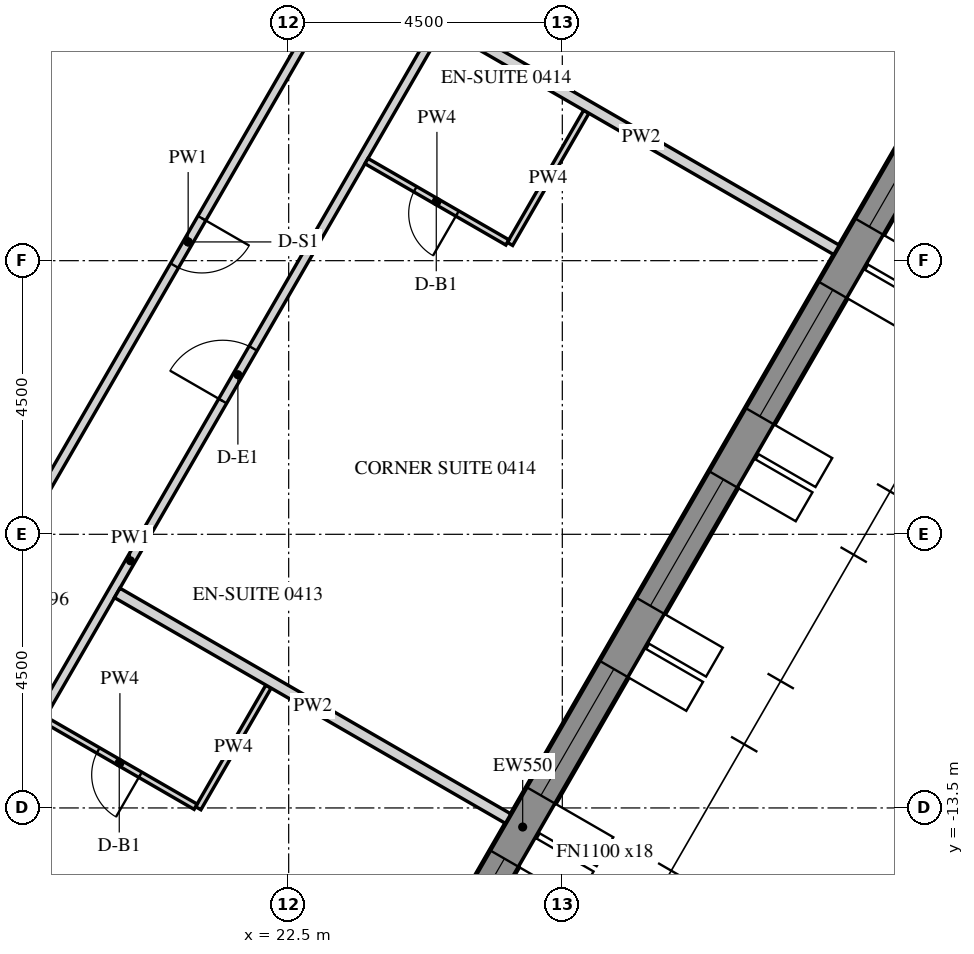
"""IFC4 building model, lengths in metres.
Left out: names, types, materials, properties, quantities, classifications, styles, units other than length and angle.
Written with IfcOpenShell. Run it as: python <this file> out.ifc"""

import sys

from ifc_helpers import new_model, si_unit, direction, frame, frame_2d, origin, place, context, subcontext, project, spatial, polyline, rectangle, outline, extrude, element, fill, save


model = new_model("IFC4")
c1 = context("Model", 3, precision=1e-05, world=origin(), true_north=direction((0.0, 1.0)))
c2 = subcontext(c1, "Body", "Model", "MODEL_VIEW")
j1 = project(units=[si_unit("LENGTHUNIT", "METRE"), si_unit("PLANEANGLEUNIT", "RADIAN")], contexts=[c1])
p1 = place(None, origin())
s1 = spatial("IfcSite", under=j1, at=p1, CompositionType="ELEMENT")
p2 = place(p1, origin())
s2 = spatial("IfcBuilding", under=s1, at=p2, CompositionType="ELEMENT")
p3 = place(p2, frame((0.0, 0.0, 68.7)))
s3 = spatial("IfcBuildingStorey", under=s2, at=p3, CompositionType="ELEMENT", Elevation=68.7)
p4 = place(p3, frame((18.83, -26.835, -0.15), z_axis=(0.0, 0.0, 1.0), x_axis=(0.500003800416, 0.866023209602, 0.0)))
e1 = element("IfcWall", 1, at=p4, inside=s3, PredefinedType="SOLIDWALL", context=c2, shape_type="SweptSolid", body=[
    extrude(outline(polyline([(-0.022, -0.275), (30.097, -0.275), (30.045, 0.275), (0.022, 0.275), (-0.022, -0.275)])), origin(), (0.0, 0.0, 1.0), 3.9),
])
p5 = place(p4, frame((1.236, 0.0, 1.05)))
e2 = element("IfcOpeningElement", 2, at=p5, cuts=e1, PredefinedType="OPENING", context=c2, shape_type="SweptSolid", body=[
    extrude(rectangle(XDim=2.4, YDim=2.4, at=frame_2d((1.2, 1.2))), frame((0.0, 0.285, 0.0), z_axis=(0.0, -1.0, 0.0), x_axis=(1.0, 0.0, 0.0)), (0.0, 0.0, 1.0), 0.57),
])
p6 = place(p4, frame((4.835, 0.0, 1.05)))
e3 = element("IfcOpeningElement", 3, at=p6, cuts=e1, PredefinedType="OPENING", context=c2, shape_type="SweptSolid", body=[
    extrude(rectangle(XDim=2.4, YDim=2.4, at=frame_2d((1.2, 1.2))), frame((0.0, 0.285, 0.0), z_axis=(0.0, -1.0, 0.0), x_axis=(1.0, 0.0, 0.0)), (0.0, 0.0, 1.0), 0.57),
])
p7 = place(p4, frame((8.436, 0.0, 1.05)))
e4 = element("IfcOpeningElement", 4, at=p7, cuts=e1, PredefinedType="OPENING", context=c2, shape_type="SweptSolid", body=[
    extrude(rectangle(XDim=2.4, YDim=2.4, at=frame_2d((1.2, 1.2))), frame((0.0, 0.285, 0.0), z_axis=(0.0, -1.0, 0.0), x_axis=(1.0, 0.0, 0.0)), (0.0, 0.0, 1.0), 0.57),
])
p8 = place(p4, frame((12.035, 0.0, 1.05)))
e5 = element("IfcOpeningElement", 5, at=p8, cuts=e1, PredefinedType="OPENING", context=c2, shape_type="SweptSolid", body=[
    extrude(rectangle(XDim=2.4, YDim=2.4, at=frame_2d((1.2, 1.2))), frame((0.0, 0.285, 0.0), z_axis=(0.0, -1.0, 0.0), x_axis=(1.0, 0.0, 0.0)), (0.0, 0.0, 1.0), 0.57),
])
p9 = place(p4, frame((15.635, 0.0, 1.05)))
e6 = element("IfcOpeningElement", 6, at=p9, cuts=e1, PredefinedType="OPENING", context=c2, shape_type="SweptSolid", body=[
    extrude(rectangle(XDim=2.4, YDim=2.4, at=frame_2d((1.2, 1.2))), frame((0.0, 0.285, 0.0), z_axis=(0.0, -1.0, 0.0), x_axis=(1.0, 0.0, 0.0)), (0.0, 0.0, 1.0), 0.57),
])
p10 = place(p4, frame((19.236, 0.0, 1.05)))
e7 = element("IfcOpeningElement", 7, at=p10, cuts=e1, PredefinedType="OPENING", context=c2, shape_type="SweptSolid", body=[
    extrude(rectangle(XDim=2.4, YDim=2.4, at=frame_2d((1.2, 1.2))), frame((0.0, 0.285, 0.0), z_axis=(0.0, -1.0, 0.0), x_axis=(1.0, 0.0, 0.0)), (0.0, 0.0, 1.0), 0.57),
])
p11 = place(p4, frame((22.835, 0.0, 1.05)))
e8 = element("IfcOpeningElement", 8, at=p11, cuts=e1, PredefinedType="OPENING", context=c2, shape_type="SweptSolid", body=[
    extrude(rectangle(XDim=2.4, YDim=2.4, at=frame_2d((1.2, 1.2))), frame((0.0, 0.285, 0.0), z_axis=(0.0, -1.0, 0.0), x_axis=(1.0, 0.0, 0.0)), (0.0, 0.0, 1.0), 0.57),
])
p12 = place(p4, frame((26.436, 0.0, 1.05)))
e9 = element("IfcOpeningElement", 9, at=p12, cuts=e1, PredefinedType="OPENING", context=c2, shape_type="SweptSolid", body=[
    extrude(rectangle(XDim=2.4, YDim=2.4, at=frame_2d((1.2, 1.2))), frame((0.0, 0.285, 0.0), z_axis=(0.0, -1.0, 0.0), x_axis=(1.0, 0.0, 0.0)), (0.0, 0.0, 1.0), 0.57),
])
p13 = place(p3, frame((13.928, -19.775, 0.0), z_axis=(0.0, 0.0, 1.0), x_axis=(0.50000450071, 0.866022805283, 0.0)))
e10 = element("IfcWall", 10, at=p13, inside=s3, PredefinedType="PARTITIONING", context=c2, shape_type="SweptSolid", body=[
    extrude(rectangle(XDim=23.877, YDim=0.15, at=frame_2d((11.938, 0.0))), origin(), (0.0, 0.0, 1.0), 2.988),
])
p14 = place(p13, frame((3.943, 0.0, 0.0)))
e11 = element("IfcOpeningElement", 11, at=p14, cuts=e10, PredefinedType="OPENING", context=c2, shape_type="SweptSolid", body=[
    extrude(rectangle(XDim=1.0, YDim=2.1, at=frame_2d((0.5, 1.05))), frame((0.0, 0.085, 0.0), z_axis=(0.0, -1.0, 0.0), x_axis=(1.0, 0.0, 0.0)), (0.0, 0.0, 1.0), 0.17),
])
p15 = place(p13, frame((14.972, 0.0, 0.0)))
e12 = element("IfcOpeningElement", 12, at=p15, cuts=e10, PredefinedType="OPENING", context=c2, shape_type="SweptSolid", body=[
    extrude(rectangle(XDim=1.0, YDim=2.1, at=frame_2d((0.5, 1.05))), frame((0.0, 0.085, 0.0), z_axis=(0.0, -1.0, 0.0), x_axis=(1.0, 0.0, 0.0)), (0.0, 0.0, 1.0), 0.17),
])
p16 = place(p3, frame((23.704, 0.757, 0.0), z_axis=(0.0, 0.0, 1.0), x_axis=(-0.500010297365, -0.866019458516, 0.0)))
e13 = element("IfcWall", 13, at=p16, inside=s3, PredefinedType="PARTITIONING", context=c2, shape_type="SweptSolid", body=[
    extrude(rectangle(XDim=11.429, YDim=0.15, at=frame_2d((5.714, 0.0))), origin(), (0.0, 0.0, 1.0), 2.988),
])
p17 = place(p16, frame((5.264, 0.0, 0.0)))
e14 = element("IfcOpeningElement", 14, at=p17, cuts=e13, PredefinedType="OPENING", context=c2, shape_type="SweptSolid", body=[
    extrude(rectangle(XDim=0.9, YDim=2.1, at=frame_2d((0.45, 1.05))), frame((0.0, 0.085, 0.0), z_axis=(0.0, -1.0, 0.0), x_axis=(1.0, 0.0, 0.0)), (0.0, 0.0, 1.0), 0.17),
])
p18 = place(p3, frame((22.168, -11.504, 0.0), z_axis=(0.0, 0.0, 1.0), x_axis=(-0.500015210774, -0.866016621662, 0.0)))
e15 = element("IfcWall", 15, at=p18, inside=s3, PredefinedType="PARTITIONING", context=c2, shape_type="SweptSolid", body=[
    extrude(rectangle(XDim=2.31, YDim=0.1, at=frame_2d((1.155, 0.0))), origin(), (0.0, 0.0, 1.0), 2.988),
])
p19 = place(p3, frame((20.969, -13.48, 0.0), z_axis=(0.0, 0.0, 1.0), x_axis=(-0.866018712932, 0.500011588718, 0.0)))
e16 = element("IfcWall", 16, at=p19, inside=s3, PredefinedType="PARTITIONING", context=c2, shape_type="SweptSolid", body=[
    extrude(rectangle(XDim=2.875, YDim=0.1, at=frame_2d((1.438, 0.0))), origin(), (0.0, 0.0, 1.0), 2.988),
])
p20 = place(p19, frame((1.05, 0.0, 0.0)))
e17 = element("IfcOpeningElement", 17, at=p20, cuts=e16, PredefinedType="OPENING", context=c2, shape_type="SweptSolid", body=[
    extrude(rectangle(XDim=0.8, YDim=2.1, at=frame_2d((0.4, 1.05))), frame((0.0, 0.06, 0.0), z_axis=(0.0, -1.0, 0.0), x_axis=(1.0, 0.0, 0.0)), (0.0, 0.0, 1.0), 0.12),
])
p21 = place(p3, frame((26.11, -13.676, 0.0), z_axis=(0.0, 0.0, 1.0), x_axis=(-0.866014745021, 0.500018461065, 0.0)))
e18 = element("IfcWall", 18, at=p21, inside=s3, PredefinedType="PARTITIONING", context=c2, shape_type="SweptSolid", body=[
    extrude(rectangle(XDim=7.425, YDim=0.18, at=frame_2d((3.712, 0.0))), origin(), (0.0, 0.0, 1.0), 2.988),
])
p22 = place(p3, frame((27.395, -2.051, 0.0), z_axis=(0.0, 0.0, 1.0), x_axis=(-0.50001992892, -0.866013897511, 0.0)))
e19 = element("IfcWall", 19, at=p22, inside=s3, PredefinedType="PARTITIONING", context=c2, shape_type="SweptSolid", body=[
    extrude(rectangle(XDim=2.51, YDim=0.1, at=frame_2d((1.255, 0.0))), origin(), (0.0, 0.0, 1.0), 2.988),
])
p23 = place(p3, frame((26.096, -4.2, 0.0), z_axis=(0.0, 0.0, 1.0), x_axis=(-0.86604424267, 0.499967368674, 0.0)))
e20 = element("IfcWall", 20, at=p23, inside=s3, PredefinedType="PARTITIONING", context=c2, shape_type="SweptSolid", body=[
    extrude(rectangle(XDim=2.675, YDim=0.1, at=frame_2d((1.337, 0.0))), origin(), (0.0, 0.0, 1.0), 2.988),
])
p24 = place(p23, frame((0.95, 0.0, 0.0)))
e21 = element("IfcOpeningElement", 21, at=p24, cuts=e20, PredefinedType="OPENING", context=c2, shape_type="SweptSolid", body=[
    extrude(rectangle(XDim=0.8, YDim=2.1, at=frame_2d((0.4, 1.05))), frame((0.0, 0.06, 0.0), z_axis=(0.0, -1.0, 0.0), x_axis=(1.0, 0.0, 0.0)), (0.0, 0.0, 1.0), 0.12),
])
p25 = place(p3, frame((31.51, -4.323, 0.0), z_axis=(0.0, 0.0, 1.0), x_axis=(-0.866028983062, 0.499993800457, 0.0)))
e22 = element("IfcWall", 22, at=p25, inside=s3, PredefinedType="PARTITIONING", context=c2, shape_type="SweptSolid", body=[
    extrude(rectangle(XDim=7.425, YDim=0.18, at=frame_2d((3.712, 0.0))), origin(), (0.0, 0.0, 1.0), 2.988),
])
p26 = place(p8, frame((0.0, 0.205, 0.0)))
e23 = element("IfcWindow", 23, at=p26, inside=s3, PartitioningType="DOUBLE_PANEL_VERTICAL", PredefinedType="WINDOW", context=c2, shape_type="SweptSolid", body=[
    extrude(rectangle(XDim=2.4, YDim=2.4, at=frame_2d((1.2, 1.2))), frame((0.0, 0.03, 0.0), z_axis=(0.0, -1.0, 0.0), x_axis=(1.0, 0.0, 0.0)), (0.0, 0.0, 1.0), 0.06),
])
fill(e5, e23)
p27 = place(p9, frame((0.0, 0.205, 0.0)))
e24 = element("IfcWindow", 24, at=p27, inside=s3, PartitioningType="DOUBLE_PANEL_VERTICAL", PredefinedType="WINDOW", context=c2, shape_type="SweptSolid", body=[
    extrude(rectangle(XDim=2.4, YDim=2.4, at=frame_2d((1.2, 1.2))), frame((0.0, 0.03, 0.0), z_axis=(0.0, -1.0, 0.0), x_axis=(1.0, 0.0, 0.0)), (0.0, 0.0, 1.0), 0.06),
])
fill(e6, e24)
p28 = place(p10, frame((0.0, 0.205, 0.0)))
e25 = element("IfcWindow", 25, at=p28, inside=s3, PartitioningType="DOUBLE_PANEL_VERTICAL", PredefinedType="WINDOW", context=c2, shape_type="SweptSolid", body=[
    extrude(rectangle(XDim=2.4, YDim=2.4, at=frame_2d((1.2, 1.2))), frame((0.0, 0.03, 0.0), z_axis=(0.0, -1.0, 0.0), x_axis=(1.0, 0.0, 0.0)), (0.0, 0.0, 1.0), 0.06),
])
fill(e7, e25)
p29 = place(p11, frame((0.0, 0.205, 0.0)))
e26 = element("IfcWindow", 26, at=p29, inside=s3, PartitioningType="DOUBLE_PANEL_VERTICAL", PredefinedType="WINDOW", context=c2, shape_type="SweptSolid", body=[
    extrude(rectangle(XDim=2.4, YDim=2.4, at=frame_2d((1.2, 1.2))), frame((0.0, 0.03, 0.0), z_axis=(0.0, -1.0, 0.0), x_axis=(1.0, 0.0, 0.0)), (0.0, 0.0, 1.0), 0.06),
])
fill(e8, e26)
p30 = place(p12, frame((0.0, 0.205, 0.0)))
e27 = element("IfcWindow", 27, at=p30, inside=s3, PartitioningType="DOUBLE_PANEL_VERTICAL", PredefinedType="WINDOW", context=c2, shape_type="SweptSolid", body=[
    extrude(rectangle(XDim=2.4, YDim=2.4, at=frame_2d((1.2, 1.2))), frame((0.0, 0.03, 0.0), z_axis=(0.0, -1.0, 0.0), x_axis=(1.0, 0.0, 0.0)), (0.0, 0.0, 1.0), 0.06),
])
fill(e9, e27)
p31 = place(p20, origin())
e28 = element("IfcDoor", 28, at=p31, inside=s3, OperationType="SINGLE_SWING_RIGHT", PredefinedType="DOOR", context=c2, shape_type="SweptSolid", body=[
    extrude(rectangle(XDim=0.8, YDim=2.1, at=frame_2d((0.4, 1.05))), frame((0.0, 0.025, 0.0), z_axis=(0.0, -1.0, 0.0), x_axis=(1.0, 0.0, 0.0)), (0.0, 0.0, 1.0), 0.05),
])
fill(e17, e28)
p32 = place(p15, origin())
e29 = element("IfcDoor", 29, at=p32, inside=s3, OperationType="SINGLE_SWING_LEFT", PredefinedType="DOOR", context=c2, shape_type="SweptSolid", body=[
    extrude(rectangle(XDim=1.0, YDim=2.1, at=frame_2d((0.5, 1.05))), frame((0.0, 0.025, 0.0), z_axis=(0.0, -1.0, 0.0), x_axis=(1.0, 0.0, 0.0)), (0.0, 0.0, 1.0), 0.05),
])
fill(e12, e29)
p33 = place(p24, origin())
e30 = element("IfcDoor", 30, at=p33, inside=s3, OperationType="SINGLE_SWING_LEFT", PredefinedType="DOOR", context=c2, shape_type="SweptSolid", body=[
    extrude(rectangle(XDim=0.8, YDim=2.1, at=frame_2d((0.4, 1.05))), frame((0.0, 0.025, 0.0), z_axis=(0.0, -1.0, 0.0), x_axis=(1.0, 0.0, 0.0)), (0.0, 0.0, 1.0), 0.05),
])
fill(e21, e30)
p34 = place(p17, origin())
e31 = element("IfcDoor", 31, at=p34, inside=s3, OperationType="SINGLE_SWING_LEFT", PredefinedType="DOOR", context=c2, shape_type="SweptSolid", body=[
    extrude(rectangle(XDim=0.9, YDim=2.1, at=frame_2d((0.45, 1.05))), frame((0.0, 0.025, 0.0), z_axis=(0.0, -1.0, 0.0), x_axis=(1.0, 0.0, 0.0)), (0.0, 0.0, 1.0), 0.05),
])
fill(e14, e31)
save(model, sys.argv[1])
